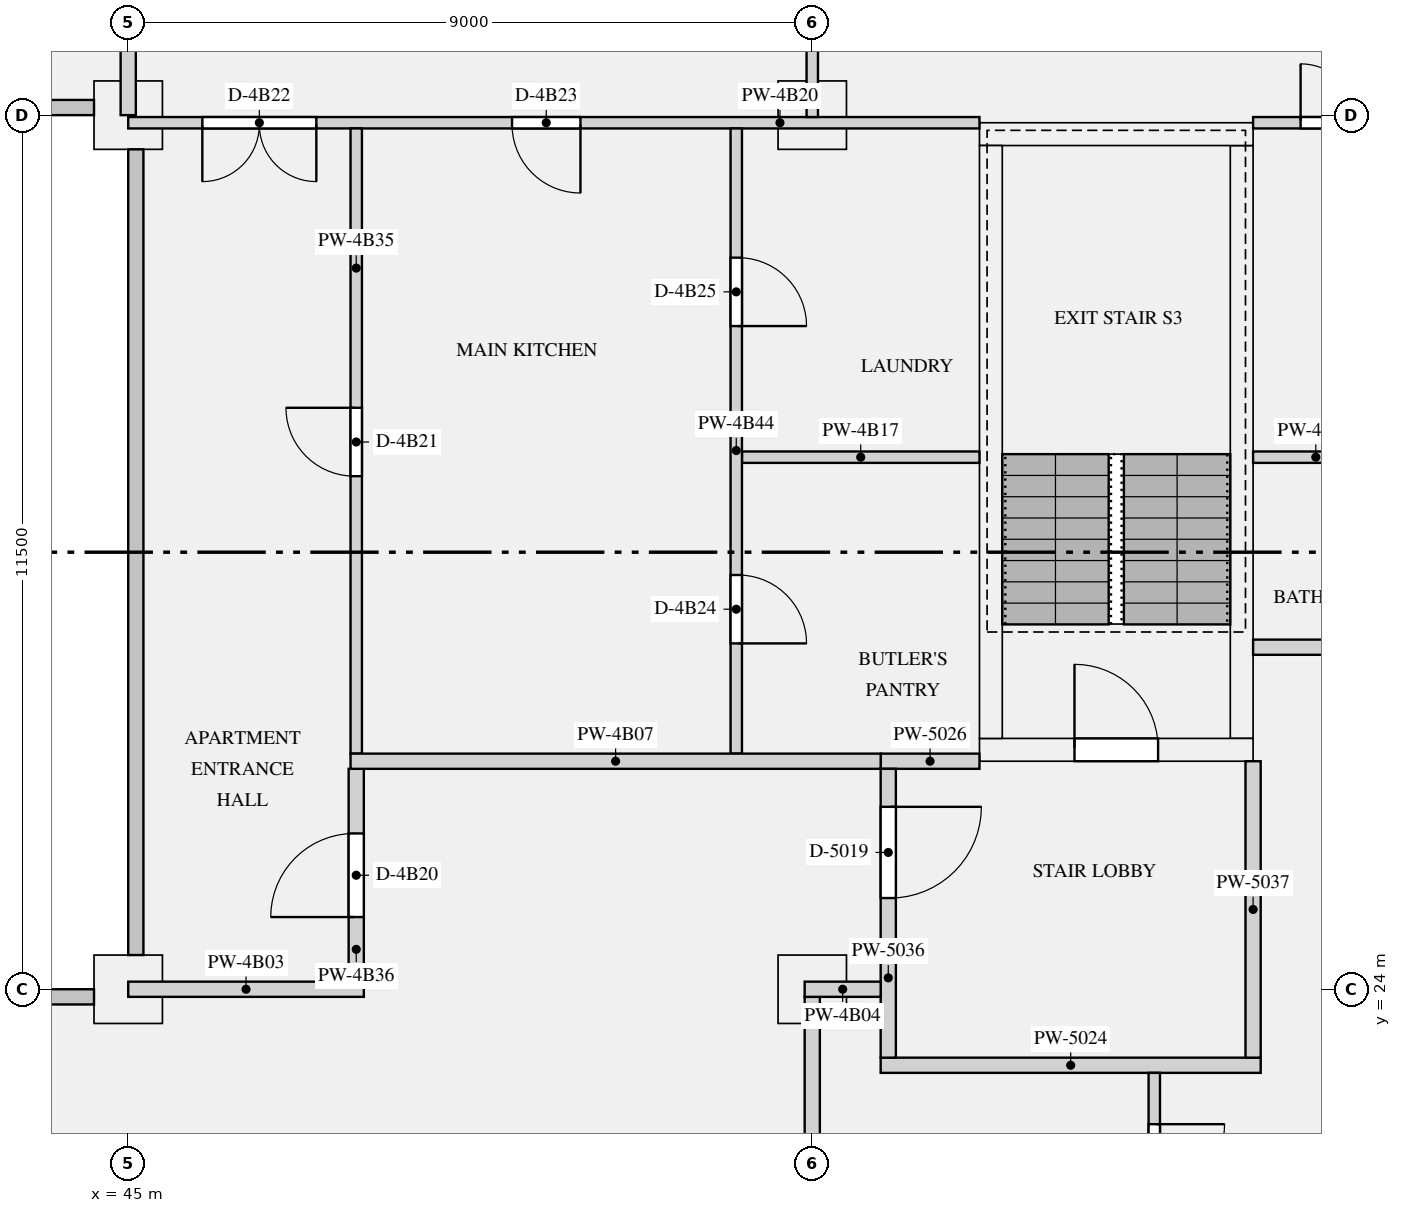
"""IFC4 building model, lengths in metres.
Left out: names, types, materials, properties, quantities, classifications, styles, units other than length and angle.
Written with IfcOpenShell. Run it as: python <this file> out.ifc"""

import sys

from ifc_helpers import new_model, si_unit, direction, frame, frame_2d, origin, origin_2d, place, context, subcontext, project, spatial, rectangle, extrude, element, fill, save


model = new_model("IFC4")
c1 = context("Model", 3, precision=1e-05, world=origin(), true_north=direction((0.0, 1.0)))
c2 = subcontext(c1, "Body", "Model", "MODEL_VIEW")
j1 = project(units=[si_unit("LENGTHUNIT", "METRE"), si_unit("PLANEANGLEUNIT", "RADIAN")], contexts=[c1])
p1 = place(None, origin())
s1 = spatial("IfcSite", under=j1, at=p1, CompositionType="ELEMENT")
p2 = place(p1, origin())
s2 = spatial("IfcBuilding", under=s1, at=p2, CompositionType="ELEMENT")
p3 = place(p2, frame((0.0, 0.0, 207.45)))
s3 = spatial("IfcBuildingStorey", under=s2, at=p3, CompositionType="ELEMENT", Elevation=207.45)
for number, where, z_axis, x_axis in (
    (1, (45.0, 24.0, 0.0), (0.0, 0.0, 1.0), (1.0, 0.0, 0.0)),
    (2, (54.0, 24.0, 0.0), (0.0, 0.0, 1.0), (1.0, 0.0, 0.0)),
    (3, (45.0, 35.5, 0.0), (0.0, 0.0, 1.0), (1.0, 0.0, 0.0)),
    (4, (54.0, 35.5, 0.0), (0.0, 0.0, 1.0), (1.0, 0.0, 0.0)),
):
    element("IfcColumn", number, at=place(p3, frame(where, z_axis=z_axis, x_axis=x_axis)), inside=s3, PredefinedType="COLUMN", context=c2, shape_type="SweptSolid", body=[
        extrude(rectangle(XDim=0.9, YDim=0.9, at=origin_2d()), origin(), (0.0, 0.0, 1.0), 3.15),
    ])
p4 = place(p3, frame((56.2, 27.15, 0.0), z_axis=(0.0, 0.0, 1.0), x_axis=(1.0, 0.0, 0.0)))
e5 = element("IfcWall", 5, at=p4, inside=s3, PredefinedType="SHEAR", context=c2, shape_type="SweptSolid", body=[
    extrude(rectangle(XDim=3.6, YDim=0.3, at=frame_2d((1.8, 0.0))), origin(), (0.0, 0.0, 1.0), 3.15),
])
p5 = place(p4, frame((1.25, 0.0, 0.0)))
e6 = element("IfcOpeningElement", 6, at=p5, cuts=e5, PredefinedType="OPENING", context=c2, shape_type="SweptSolid", body=[
    extrude(rectangle(XDim=1.1, YDim=2.1, at=frame_2d((0.55, 1.05))), frame((0.0, 0.16, 0.0), z_axis=(0.0, -1.0, 0.0), x_axis=(1.0, 0.0, 0.0)), (0.0, 0.0, 1.0), 0.32),
])
p6 = place(p3, frame((56.2, 35.25, 0.0), z_axis=(0.0, 0.0, 1.0), x_axis=(1.0, 0.0, 0.0)))
e7 = element("IfcWall", 7, at=p6, inside=s3, PredefinedType="SHEAR", context=c2, shape_type="SweptSolid", body=[
    extrude(rectangle(XDim=3.6, YDim=0.3, at=frame_2d((1.8, 0.0))), origin(), (0.0, 0.0, 1.0), 3.15),
])
for number, where, z_axis, x_axis in (
    (8, (56.35, 27.3, 0.0), (0.0, 0.0, 1.0), (0.0, 1.0, 0.0)),
    (9, (59.65, 27.3, 0.0), (0.0, 0.0, 1.0), (0.0, 1.0, 0.0)),
):
    element("IfcWall", number, at=place(p3, frame(where, z_axis=z_axis, x_axis=x_axis)), inside=s3, PredefinedType="SHEAR", context=c2, shape_type="SweptSolid", body=[
        extrude(rectangle(XDim=7.8, YDim=0.3, at=frame_2d((3.9, 0.0))), origin(), (0.0, 0.0, 1.0), 3.15),
    ])
p7 = place(p3, frame((54.9, 23.0, 0.0), z_axis=(0.0, 0.0, 1.0), x_axis=(1.0, 0.0, 0.0)))
e10 = element("IfcWall", 10, at=p7, inside=s3, PredefinedType="PARTITIONING", context=c2, shape_type="SweptSolid", body=[
    extrude(rectangle(XDim=5.0, YDim=0.2, at=frame_2d((2.5, 0.0))), origin(), (0.0, 0.0, 1.0), 2.83),
])
p8 = place(p3, frame((54.9, 27.0, 0.0), z_axis=(0.0, 0.0, 1.0), x_axis=(1.0, 0.0, 0.0)))
e11 = element("IfcWall", 11, at=p8, inside=s3, PredefinedType="PARTITIONING", context=c2, shape_type="SweptSolid", body=[
    extrude(rectangle(XDim=1.3, YDim=0.2, at=frame_2d((0.65, 0.0))), origin(), (0.0, 0.0, 1.0), 2.83),
])
p9 = place(p3, frame((55.0, 23.1, 0.0), z_axis=(0.0, 0.0, 1.0), x_axis=(0.0, 1.0, 0.0)))
e12 = element("IfcWall", 12, at=p9, inside=s3, PredefinedType="PARTITIONING", context=c2, shape_type="SweptSolid", body=[
    extrude(rectangle(XDim=3.8, YDim=0.2, at=frame_2d((1.9, 0.0))), origin(), (0.0, 0.0, 1.0), 2.83),
])
p10 = place(p9, frame((2.1, 0.0, 0.0)))
e13 = element("IfcOpeningElement", 13, at=p10, cuts=e12, PredefinedType="OPENING", context=c2, shape_type="SweptSolid", body=[
    extrude(rectangle(XDim=1.2, YDim=2.1, at=frame_2d((0.6, 1.05))), frame((0.0, 0.11, 0.0), z_axis=(0.0, -1.0, 0.0), x_axis=(1.0, 0.0, 0.0)), (0.0, 0.0, 1.0), 0.22),
])
p11 = place(p3, frame((59.8, 23.1, 0.0), z_axis=(0.0, 0.0, 1.0), x_axis=(0.0, 1.0, 0.0)))
e14 = element("IfcWall", 14, at=p11, inside=s3, PredefinedType="PARTITIONING", context=c2, shape_type="SweptSolid", body=[
    extrude(rectangle(XDim=3.9, YDim=0.2, at=frame_2d((1.95, 0.0))), origin(), (0.0, 0.0, 1.0), 2.83),
])
p12 = place(p3, frame((45.0, 24.0, 0.0), z_axis=(0.0, 0.0, 1.0), x_axis=(1.0, 0.0, 0.0)))
e15 = element("IfcWall", 15, at=p12, inside=s3, PredefinedType="PARTITIONING", context=c2, shape_type="SweptSolid", body=[
    extrude(rectangle(XDim=3.1, YDim=0.2, at=frame_2d((1.55, 0.0))), origin(), (0.0, 0.0, 1.0), 2.83),
])
p13 = place(p3, frame((53.9, 24.0, 0.0), z_axis=(0.0, 0.0, 1.0), x_axis=(1.0, 0.0, 0.0)))
e16 = element("IfcWall", 16, at=p13, inside=s3, PredefinedType="PARTITIONING", context=c2, shape_type="SweptSolid", body=[
    extrude(rectangle(XDim=1.0, YDim=0.2, at=frame_2d((0.5, 0.0))), origin(), (0.0, 0.0, 1.0), 2.83),
])
p14 = place(p3, frame((47.925, 27.0, 0.0), z_axis=(0.0, 0.0, 1.0), x_axis=(1.0, 0.0, 0.0)))
e17 = element("IfcWall", 17, at=p14, inside=s3, PredefinedType="PARTITIONING", context=c2, shape_type="SweptSolid", body=[
    extrude(rectangle(XDim=6.975, YDim=0.2, at=frame_2d((3.487, 0.0))), origin(), (0.0, 0.0, 1.0), 2.83),
])
p15 = place(p3, frame((53.075, 31.0, 0.0), z_axis=(0.0, 0.0, 1.0), x_axis=(1.0, 0.0, 0.0)))
e18 = element("IfcWall", 18, at=p15, inside=s3, PredefinedType="PARTITIONING", context=c2, shape_type="SweptSolid", body=[
    extrude(rectangle(XDim=3.125, YDim=0.15, at=frame_2d((1.562, 0.0))), origin(), (0.0, 0.0, 1.0), 2.83),
])
p16 = place(p3, frame((59.8, 31.0, 0.0), z_axis=(0.0, 0.0, 1.0), x_axis=(1.0, 0.0, 0.0)))
e19 = element("IfcWall", 19, at=p16, inside=s3, PredefinedType="PARTITIONING", context=c2, shape_type="SweptSolid", body=[
    extrude(rectangle(XDim=4.125, YDim=0.15, at=frame_2d((2.062, 0.0))), origin(), (0.0, 0.0, 1.0), 2.83),
])
p17 = place(p16, frame((1.65, 0.0, 0.0)))
e20 = element("IfcOpeningElement", 20, at=p17, cuts=e19, PredefinedType="OPENING", context=c2, shape_type="SweptSolid", body=[
    extrude(rectangle(XDim=0.9, YDim=2.1, at=frame_2d((0.45, 1.05))), frame((0.0, 0.085, 0.0), z_axis=(0.0, -1.0, 0.0), x_axis=(1.0, 0.0, 0.0)), (0.0, 0.0, 1.0), 0.17),
])
p18 = place(p3, frame((45.0, 35.4, 0.0), z_axis=(0.0, 0.0, 1.0), x_axis=(1.0, 0.0, 0.0)))
e21 = element("IfcWall", 21, at=p18, inside=s3, PredefinedType="PARTITIONING", context=c2, shape_type="SweptSolid", body=[
    extrude(rectangle(XDim=11.2, YDim=0.15, at=frame_2d((5.6, 0.0))), origin(), (0.0, 0.0, 1.0), 2.83),
])
p19 = place(p18, frame((0.975, 0.0, 0.0)))
e22 = element("IfcOpeningElement", 22, at=p19, cuts=e21, PredefinedType="OPENING", context=c2, shape_type="SweptSolid", body=[
    extrude(rectangle(XDim=1.5, YDim=2.1, at=frame_2d((0.75, 1.05))), frame((0.0, 0.085, 0.0), z_axis=(0.0, -1.0, 0.0), x_axis=(1.0, 0.0, 0.0)), (0.0, 0.0, 1.0), 0.17),
])
p20 = place(p18, frame((5.05, 0.0, 0.0)))
e23 = element("IfcOpeningElement", 23, at=p20, cuts=e21, PredefinedType="OPENING", context=c2, shape_type="SweptSolid", body=[
    extrude(rectangle(XDim=0.9, YDim=2.1, at=frame_2d((0.45, 1.05))), frame((0.0, 0.085, 0.0), z_axis=(0.0, -1.0, 0.0), x_axis=(1.0, 0.0, 0.0)), (0.0, 0.0, 1.0), 0.17),
])
p21 = place(p3, frame((59.8, 35.4, 0.0), z_axis=(0.0, 0.0, 1.0), x_axis=(1.0, 0.0, 0.0)))
e24 = element("IfcWall", 24, at=p21, inside=s3, PredefinedType="PARTITIONING", context=c2, shape_type="SweptSolid", body=[
    extrude(rectangle(XDim=7.775, YDim=0.15, at=frame_2d((3.887, 0.0))), origin(), (0.0, 0.0, 1.0), 2.83),
])
p22 = place(p21, frame((0.625, 0.0, 0.0)))
e25 = element("IfcOpeningElement", 25, at=p22, cuts=e24, PredefinedType="OPENING", context=c2, shape_type="SweptSolid", body=[
    extrude(rectangle(XDim=1.5, YDim=2.1, at=frame_2d((0.75, 1.05))), frame((0.0, 0.085, 0.0), z_axis=(0.0, -1.0, 0.0), x_axis=(1.0, 0.0, 0.0)), (0.0, 0.0, 1.0), 0.17),
])
p23 = place(p3, frame((59.8, 28.5, 0.0), z_axis=(0.0, 0.0, 1.0), x_axis=(1.0, 0.0, 0.0)))
e26 = element("IfcWall", 26, at=p23, inside=s3, PredefinedType="PARTITIONING", context=c2, shape_type="SweptSolid", body=[
    extrude(rectangle(XDim=9.05, YDim=0.2, at=frame_2d((4.525, 0.0))), origin(), (0.0, 0.0, 1.0), 2.83),
])
p24 = place(p3, frame((54.0, 35.475, 0.0), z_axis=(0.0, 0.0, 1.0), x_axis=(0.0, 1.0, 0.0)))
e27 = element("IfcWall", 27, at=p24, inside=s3, PredefinedType="PARTITIONING", context=c2, shape_type="SweptSolid", body=[
    extrude(rectangle(XDim=5.375, YDim=0.15, at=frame_2d((2.688, 0.0))), origin(), (0.0, 0.0, 1.0), 2.83),
])
p25 = place(p24, frame((2.25, 0.0, 0.0)))
e28 = element("IfcOpeningElement", 28, at=p25, cuts=e27, PredefinedType="OPENING", context=c2, shape_type="SweptSolid", body=[
    extrude(rectangle(XDim=1.5, YDim=2.1, at=frame_2d((0.75, 1.05))), frame((0.0, 0.085, 0.0), z_axis=(0.0, -1.0, 0.0), x_axis=(1.0, 0.0, 0.0)), (0.0, 0.0, 1.0), 0.17),
])
p26 = place(p3, frame((54.0, 16.1, 0.0), z_axis=(0.0, 0.0, 1.0), x_axis=(0.0, 1.0, 0.0)))
e29 = element("IfcWall", 29, at=p26, inside=s3, PredefinedType="PARTITIONING", context=c2, shape_type="SweptSolid", body=[
    extrude(rectangle(XDim=7.8, YDim=0.2, at=frame_2d((3.9, 0.0))), origin(), (0.0, 0.0, 1.0), 2.83),
])
p27 = place(p26, frame((1.85, 0.0, 0.0)))
e30 = element("IfcOpeningElement", 30, at=p27, cuts=e29, PredefinedType="OPENING", context=c2, shape_type="SweptSolid", body=[
    extrude(rectangle(XDim=1.1, YDim=2.1, at=frame_2d((0.55, 1.05))), frame((0.0, 0.11, 0.0), z_axis=(0.0, -1.0, 0.0), x_axis=(1.0, 0.0, 0.0)), (0.0, 0.0, 1.0), 0.22),
])
p28 = place(p3, frame((48.0, 27.1, 0.0), z_axis=(0.0, 0.0, 1.0), x_axis=(0.0, 1.0, 0.0)))
e31 = element("IfcWall", 31, at=p28, inside=s3, PredefinedType="PARTITIONING", context=c2, shape_type="SweptSolid", body=[
    extrude(rectangle(XDim=8.225, YDim=0.15, at=frame_2d((4.112, 0.0))), origin(), (0.0, 0.0, 1.0), 2.83),
])
p29 = place(p28, frame((3.65, 0.0, 0.0)))
e32 = element("IfcOpeningElement", 32, at=p29, cuts=e31, PredefinedType="OPENING", context=c2, shape_type="SweptSolid", body=[
    extrude(rectangle(XDim=0.9, YDim=2.1, at=frame_2d((0.45, 1.05))), frame((0.0, 0.085, 0.0), z_axis=(0.0, -1.0, 0.0), x_axis=(1.0, 0.0, 0.0)), (0.0, 0.0, 1.0), 0.17),
])
p30 = place(p3, frame((48.0, 24.1, 0.0), z_axis=(0.0, 0.0, 1.0), x_axis=(0.0, 1.0, 0.0)))
e33 = element("IfcWall", 33, at=p30, inside=s3, PredefinedType="PARTITIONING", context=c2, shape_type="SweptSolid", body=[
    extrude(rectangle(XDim=2.8, YDim=0.2, at=frame_2d((1.4, 0.0))), origin(), (0.0, 0.0, 1.0), 2.83),
])
p31 = place(p30, frame((0.85, 0.0, 0.0)))
e34 = element("IfcOpeningElement", 34, at=p31, cuts=e33, PredefinedType="OPENING", context=c2, shape_type="SweptSolid", body=[
    extrude(rectangle(XDim=1.1, YDim=2.1, at=frame_2d((0.55, 1.05))), frame((0.0, 0.11, 0.0), z_axis=(0.0, -1.0, 0.0), x_axis=(1.0, 0.0, 0.0)), (0.0, 0.0, 1.0), 0.22),
])
p32 = place(p3, frame((45.0, 35.5, 0.0), z_axis=(0.0, 0.0, 1.0), x_axis=(0.0, 1.0, 0.0)))
e35 = element("IfcWall", 35, at=p32, inside=s3, PredefinedType="PARTITIONING", context=c2, shape_type="SweptSolid", body=[
    extrude(rectangle(XDim=5.35, YDim=0.2, at=frame_2d((2.675, 0.0))), origin(), (0.0, 0.0, 1.0), 2.83),
])
p33 = place(p3, frame((53.0, 27.1, 0.0), z_axis=(0.0, 0.0, 1.0), x_axis=(0.0, 1.0, 0.0)))
e36 = element("IfcWall", 36, at=p33, inside=s3, PredefinedType="PARTITIONING", context=c2, shape_type="SweptSolid", body=[
    extrude(rectangle(XDim=8.225, YDim=0.15, at=frame_2d((4.112, 0.0))), origin(), (0.0, 0.0, 1.0), 2.83),
])
p34 = place(p33, frame((1.45, 0.0, 0.0)))
e37 = element("IfcOpeningElement", 37, at=p34, cuts=e36, PredefinedType="OPENING", context=c2, shape_type="SweptSolid", body=[
    extrude(rectangle(XDim=0.9, YDim=2.1, at=frame_2d((0.45, 1.05))), frame((0.0, 0.085, 0.0), z_axis=(0.0, -1.0, 0.0), x_axis=(1.0, 0.0, 0.0)), (0.0, 0.0, 1.0), 0.17),
])
p35 = place(p33, frame((5.625, 0.0, 0.0)))
e38 = element("IfcOpeningElement", 38, at=p35, cuts=e36, PredefinedType="OPENING", context=c2, shape_type="SweptSolid", body=[
    extrude(rectangle(XDim=0.9, YDim=2.1, at=frame_2d((0.45, 1.05))), frame((0.0, 0.085, 0.0), z_axis=(0.0, -1.0, 0.0), x_axis=(1.0, 0.0, 0.0)), (0.0, 0.0, 1.0), 0.17),
])
p36 = place(p3, frame((58.5, 16.575, 0.0), z_axis=(0.0, 0.0, 1.0), x_axis=(0.0, 1.0, 0.0)))
e39 = element("IfcWall", 39, at=p36, inside=s3, PredefinedType="PARTITIONING", context=c2, shape_type="SweptSolid", body=[
    extrude(rectangle(XDim=6.325, YDim=0.15, at=frame_2d((3.163, 0.0))), origin(), (0.0, 0.0, 1.0), 2.83),
])
p37 = place(p36, frame((4.75, 0.0, 0.0)))
e40 = element("IfcOpeningElement", 40, at=p37, cuts=e39, PredefinedType="OPENING", context=c2, shape_type="SweptSolid", body=[
    extrude(rectangle(XDim=0.9, YDim=2.1, at=frame_2d((0.45, 1.05))), frame((0.0, 0.085, 0.0), z_axis=(0.0, -1.0, 0.0), x_axis=(1.0, 0.0, 0.0)), (0.0, 0.0, 1.0), 0.17),
])
p38 = place(p5, origin())
e41 = element("IfcDoor", 41, at=p38, inside=s3, OperationType="SINGLE_SWING_LEFT", PredefinedType="DOOR", context=c2, shape_type="SweptSolid", body=[
    extrude(rectangle(XDim=1.1, YDim=2.1, at=frame_2d((0.55, 1.05))), frame((0.0, 0.025, 0.0), z_axis=(0.0, -1.0, 0.0), x_axis=(1.0, 0.0, 0.0)), (0.0, 0.0, 1.0), 0.05),
])
fill(e6, e41)
p39 = place(p10, frame((1.2, 0.0, 0.0), z_axis=(0.0, 0.0, 1.0), x_axis=(-1.0, 0.0, 0.0)))
e42 = element("IfcDoor", 42, at=p39, inside=s3, OperationType="SINGLE_SWING_LEFT", PredefinedType="DOOR", context=c2, shape_type="SweptSolid", body=[
    extrude(rectangle(XDim=1.2, YDim=2.1, at=frame_2d((0.6, 1.05))), frame((0.0, 0.025, 0.0), z_axis=(0.0, -1.0, 0.0), x_axis=(1.0, 0.0, 0.0)), (0.0, 0.0, 1.0), 0.05),
])
fill(e13, e42)
p40 = place(p31, origin())
e43 = element("IfcDoor", 43, at=p40, inside=s3, OperationType="SINGLE_SWING_LEFT", PredefinedType="DOOR", context=c2, shape_type="SweptSolid", body=[
    extrude(rectangle(XDim=1.1, YDim=2.1, at=frame_2d((0.55, 1.05))), frame((0.0, 0.025, 0.0), z_axis=(0.0, -1.0, 0.0), x_axis=(1.0, 0.0, 0.0)), (0.0, 0.0, 1.0), 0.05),
])
fill(e34, e43)
p41 = place(p29, origin())
e44 = element("IfcDoor", 44, at=p41, inside=s3, OperationType="SINGLE_SWING_RIGHT", PredefinedType="DOOR", context=c2, shape_type="SweptSolid", body=[
    extrude(rectangle(XDim=0.9, YDim=2.1, at=frame_2d((0.45, 1.05))), frame((0.0, 0.025, 0.0), z_axis=(0.0, -1.0, 0.0), x_axis=(1.0, 0.0, 0.0)), (0.0, 0.0, 1.0), 0.05),
])
fill(e32, e44)
p42 = place(p19, frame((1.5, 0.0, 0.0), z_axis=(0.0, 0.0, 1.0), x_axis=(-1.0, 0.0, 0.0)))
e45 = element("IfcDoor", 45, at=p42, inside=s3, OperationType="DOUBLE_DOOR_SINGLE_SWING", PredefinedType="DOOR", context=c2, shape_type="SweptSolid", body=[
    extrude(rectangle(XDim=1.5, YDim=2.1, at=frame_2d((0.75, 1.05))), frame((0.0, 0.025, 0.0), z_axis=(0.0, -1.0, 0.0), x_axis=(1.0, 0.0, 0.0)), (0.0, 0.0, 1.0), 0.05),
])
fill(e22, e45)
p43 = place(p20, frame((0.9, 0.0, 0.0), z_axis=(0.0, 0.0, 1.0), x_axis=(-1.0, 0.0, 0.0)))
e46 = element("IfcDoor", 46, at=p43, inside=s3, OperationType="SINGLE_SWING_LEFT", PredefinedType="DOOR", context=c2, shape_type="SweptSolid", body=[
    extrude(rectangle(XDim=0.9, YDim=2.1, at=frame_2d((0.45, 1.05))), frame((0.0, 0.025, 0.0), z_axis=(0.0, -1.0, 0.0), x_axis=(1.0, 0.0, 0.0)), (0.0, 0.0, 1.0), 0.05),
])
fill(e23, e46)
p44 = place(p34, frame((0.9, 0.0, 0.0), z_axis=(0.0, 0.0, 1.0), x_axis=(-1.0, 0.0, 0.0)))
e47 = element("IfcDoor", 47, at=p44, inside=s3, OperationType="SINGLE_SWING_RIGHT", PredefinedType="DOOR", context=c2, shape_type="SweptSolid", body=[
    extrude(rectangle(XDim=0.9, YDim=2.1, at=frame_2d((0.45, 1.05))), frame((0.0, 0.025, 0.0), z_axis=(0.0, -1.0, 0.0), x_axis=(1.0, 0.0, 0.0)), (0.0, 0.0, 1.0), 0.05),
])
fill(e37, e47)
p45 = place(p35, frame((0.9, 0.0, 0.0), z_axis=(0.0, 0.0, 1.0), x_axis=(-1.0, 0.0, 0.0)))
e48 = element("IfcDoor", 48, at=p45, inside=s3, OperationType="SINGLE_SWING_RIGHT", PredefinedType="DOOR", context=c2, shape_type="SweptSolid", body=[
    extrude(rectangle(XDim=0.9, YDim=2.1, at=frame_2d((0.45, 1.05))), frame((0.0, 0.025, 0.0), z_axis=(0.0, -1.0, 0.0), x_axis=(1.0, 0.0, 0.0)), (0.0, 0.0, 1.0), 0.05),
])
fill(e38, e48)
p46 = place(p22, origin())
e49 = element("IfcDoor", 49, at=p46, inside=s3, OperationType="DOUBLE_DOOR_SINGLE_SWING", PredefinedType="DOOR", context=c2, shape_type="SweptSolid", body=[
    extrude(rectangle(XDim=1.5, YDim=2.1, at=frame_2d((0.75, 1.05))), frame((0.0, 0.025, 0.0), z_axis=(0.0, -1.0, 0.0), x_axis=(1.0, 0.0, 0.0)), (0.0, 0.0, 1.0), 0.05),
])
fill(e25, e49)
p47 = place(p37, frame((0.9, 0.0, 0.0), z_axis=(0.0, 0.0, 1.0), x_axis=(-1.0, 0.0, 0.0)))
e50 = element("IfcDoor", 50, at=p47, inside=s3, OperationType="SINGLE_SWING_LEFT", PredefinedType="DOOR", context=c2, shape_type="SweptSolid", body=[
    extrude(rectangle(XDim=0.9, YDim=2.1, at=frame_2d((0.45, 1.05))), frame((0.0, 0.025, 0.0), z_axis=(0.0, -1.0, 0.0), x_axis=(1.0, 0.0, 0.0)), (0.0, 0.0, 1.0), 0.05),
])
fill(e40, e50)
save(model, sys.argv[1])
